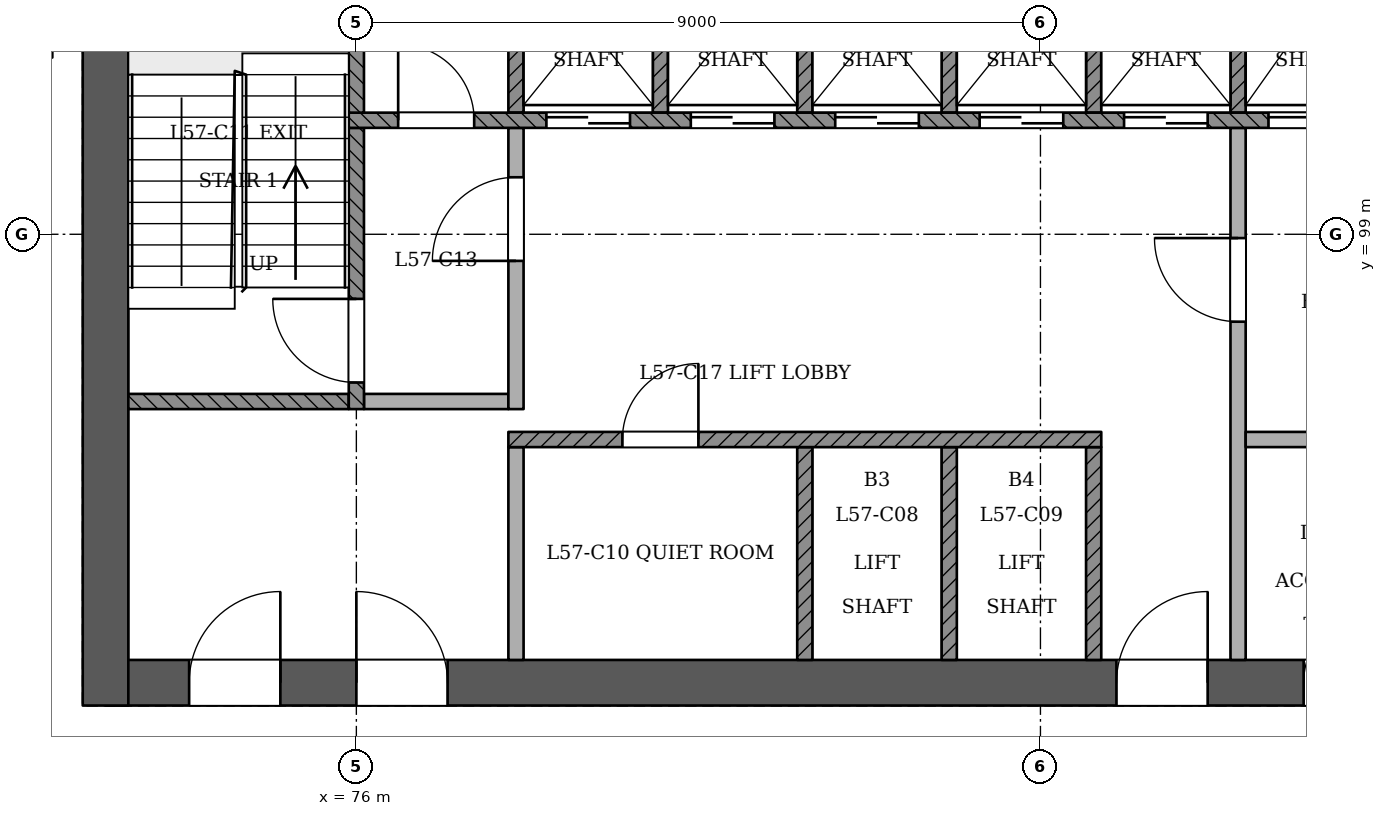
"""IFC4 building model, lengths in metres.
Left out: names, types, materials, properties, quantities, classifications, styles, units other than length and angle.
Written with IfcOpenShell. Run it as: python <this file> out.ifc"""

import sys

from ifc_helpers import new_model, si_unit, direction, frame, frame_2d, origin, place, context, subcontext, project, spatial, rectangle, extrude, element, fill, save


model = new_model("IFC4")
c1 = context("Model", 3, precision=1e-05, world=origin(), true_north=direction((0.0, 1.0)))
c2 = subcontext(c1, "Body", "Model", "MODEL_VIEW")
j1 = project(units=[si_unit("LENGTHUNIT", "METRE"), si_unit("PLANEANGLEUNIT", "RADIAN")], contexts=[c1])
p1 = place(None, origin())
s1 = spatial("IfcSite", under=j1, at=p1, CompositionType="ELEMENT")
p2 = place(p1, origin())
s2 = spatial("IfcBuilding", under=s1, at=p2, CompositionType="ELEMENT")
p3 = place(p2, frame((0.0, 0.0, 223.0)))
s3 = spatial("IfcBuildingStorey", under=s2, at=p3, CompositionType="ELEMENT", Elevation=223.0)
p4 = place(p3, frame((72.7, 93.1, 0.0), z_axis=(0.0, 0.0, 1.0), x_axis=(1.0, 0.0, 0.0)))
e1 = element("IfcWall", 1, at=p4, inside=s3, PredefinedType="SHEAR", context=c2, shape_type="SweptSolid", body=[
    extrude(rectangle(XDim=24.9, YDim=0.6, at=frame_2d((12.45, 0.0))), origin(), (0.0, 0.0, 1.0), 3.6),
])
p5 = place(p4, frame((1.1, 0.0, 0.0)))
e2 = element("IfcOpeningElement", 2, at=p5, cuts=e1, PredefinedType="OPENING", context=c2, shape_type="SweptSolid", body=[
    extrude(rectangle(XDim=1.2, YDim=2.1, at=frame_2d((0.6, 1.05))), frame((0.0, 0.311, 0.0), z_axis=(0.0, -1.0, 0.0), x_axis=(1.0, 0.0, 0.0)), (0.0, 0.0, 1.0), 0.621),
])
p6 = place(p4, frame((3.3, 0.0, 0.0)))
e3 = element("IfcOpeningElement", 3, at=p6, cuts=e1, PredefinedType="OPENING", context=c2, shape_type="SweptSolid", body=[
    extrude(rectangle(XDim=1.2, YDim=2.1, at=frame_2d((0.6, 1.05))), frame((0.0, 0.311, 0.0), z_axis=(0.0, -1.0, 0.0), x_axis=(1.0, 0.0, 0.0)), (0.0, 0.0, 1.0), 0.621),
])
p7 = place(p4, frame((13.3, 0.0, 0.0)))
e4 = element("IfcOpeningElement", 4, at=p7, cuts=e1, PredefinedType="OPENING", context=c2, shape_type="SweptSolid", body=[
    extrude(rectangle(XDim=1.2, YDim=2.1, at=frame_2d((0.6, 1.05))), frame((0.0, 0.311, 0.0), z_axis=(0.0, -1.0, 0.0), x_axis=(1.0, 0.0, 0.0)), (0.0, 0.0, 1.0), 0.621),
])
p8 = place(p4, frame((15.762, 0.0, 0.0)))
e5 = element("IfcOpeningElement", 5, at=p8, cuts=e1, PredefinedType="OPENING", context=c2, shape_type="SweptSolid", body=[
    extrude(rectangle(XDim=1.0, YDim=2.1, at=frame_2d((0.5, 1.05))), frame((0.0, 0.311, 0.0), z_axis=(0.0, -1.0, 0.0), x_axis=(1.0, 0.0, 0.0)), (0.0, 0.0, 1.0), 0.621),
])
p9 = place(p4, frame((18.2, 0.0, 0.0)))
e6 = element("IfcOpeningElement", 6, at=p9, cuts=e1, PredefinedType="OPENING", context=c2, shape_type="SweptSolid", body=[
    extrude(rectangle(XDim=1.0, YDim=2.1, at=frame_2d((0.5, 1.05))), frame((0.0, 0.311, 0.0), z_axis=(0.0, -1.0, 0.0), x_axis=(1.0, 0.0, 0.0)), (0.0, 0.0, 1.0), 0.621),
])
p10 = place(p4, frame((20.55, 0.0, 0.0)))
e7 = element("IfcOpeningElement", 7, at=p10, cuts=e1, PredefinedType="OPENING", context=c2, shape_type="SweptSolid", body=[
    extrude(rectangle(XDim=1.0, YDim=2.1, at=frame_2d((0.5, 1.05))), frame((0.0, 0.311, 0.0), z_axis=(0.0, -1.0, 0.0), x_axis=(1.0, 0.0, 0.0)), (0.0, 0.0, 1.0), 0.621),
])
p11 = place(p4, frame((22.837, 0.0, 0.0)))
e8 = element("IfcOpeningElement", 8, at=p11, cuts=e1, PredefinedType="OPENING", context=c2, shape_type="SweptSolid", body=[
    extrude(rectangle(XDim=1.0, YDim=2.1, at=frame_2d((0.5, 1.05))), frame((0.0, 0.311, 0.0), z_axis=(0.0, -1.0, 0.0), x_axis=(1.0, 0.0, 0.0)), (0.0, 0.0, 1.0), 0.621),
])
p12 = place(p3, frame((72.7, 103.7, 0.0), z_axis=(0.0, 0.0, 1.0), x_axis=(0.0, -1.0, 0.0)))
e9 = element("IfcWall", 9, at=p12, inside=s3, PredefinedType="SHEAR", context=c2, shape_type="SweptSolid", body=[
    extrude(rectangle(XDim=10.9, YDim=0.6, at=frame_2d((5.45, 0.0))), origin(), (0.0, 0.0, 1.0), 3.6),
])
p13 = place(p3, frame((72.0, 101.4, 0.0), z_axis=(0.0, 0.0, 1.0), x_axis=(-1.0, 0.0, 0.0)))
e10 = element("IfcWall", 10, at=p13, inside=s3, PredefinedType="PARTITIONING", context=c2, shape_type="SweptSolid", body=[
    extrude(rectangle(XDim=1.8, YDim=0.15, at=frame_2d((0.9, 0.0))), origin(), (0.0, 0.0, 1.0), 3.2),
])
p14 = place(p3, frame((78.1, 93.4, 0.0), z_axis=(0.0, 0.0, 1.0), x_axis=(0.0, 1.0, 0.0)))
e11 = element("IfcWall", 11, at=p14, inside=s3, PredefinedType="PARTITIONING", context=c2, shape_type="SweptSolid", body=[
    extrude(rectangle(XDim=2.8, YDim=0.2, at=frame_2d((1.4, 0.0))), origin(), (0.0, 0.0, 1.0), 3.2),
])
for number, where, z_axis, x_axis in (
    (12, (81.9, 93.4, 0.0), (0.0, 0.0, 1.0), (0.0, 1.0, 0.0)),
    (13, (83.8, 93.4, 0.0), (0.0, 0.0, 1.0), (0.0, 1.0, 0.0)),
    (14, (85.7, 93.4, 0.0), (0.0, 0.0, 1.0), (0.0, 1.0, 0.0)),
):
    element("IfcWall", number, at=place(p3, frame(where, z_axis=z_axis, x_axis=x_axis)), inside=s3, PredefinedType="SOLIDWALL", context=c2, shape_type="SweptSolid", body=[
        extrude(rectangle(XDim=2.8, YDim=0.2, at=frame_2d((1.4, 0.0))), origin(), (0.0, 0.0, 1.0), 3.2),
    ])
p15 = place(p3, frame((87.6, 93.4, 0.0), z_axis=(0.0, 0.0, 1.0), x_axis=(0.0, 1.0, 0.0)))
e15 = element("IfcWall", 15, at=p15, inside=s3, PredefinedType="PARTITIONING", context=c2, shape_type="SweptSolid", body=[
    extrude(rectangle(XDim=7.0, YDim=0.2, at=frame_2d((3.5, 0.0))), origin(), (0.0, 0.0, 1.0), 3.2),
])
p16 = place(p15, frame((4.45, 0.0, 0.0)))
e16 = element("IfcOpeningElement", 16, at=p16, cuts=e15, PredefinedType="OPENING", context=c2, shape_type="SweptSolid", body=[
    extrude(rectangle(XDim=1.1, YDim=2.1, at=frame_2d((0.55, 1.05))), frame((0.0, 0.11, 0.0), z_axis=(0.0, -1.0, 0.0), x_axis=(1.0, 0.0, 0.0)), (0.0, 0.0, 1.0), 0.221),
])
p17 = place(p3, frame((78.0, 96.3, 0.0), z_axis=(0.0, 0.0, 1.0), x_axis=(1.0, 0.0, 0.0)))
e17 = element("IfcWall", 17, at=p17, inside=s3, PredefinedType="SOLIDWALL", context=c2, shape_type="SweptSolid", body=[
    extrude(rectangle(XDim=7.8, YDim=0.2, at=frame_2d((3.9, 0.0))), origin(), (0.0, 0.0, 1.0), 3.2),
])
p18 = place(p17, frame((1.5, 0.0, 0.0)))
e18 = element("IfcOpeningElement", 18, at=p18, cuts=e17, PredefinedType="OPENING", context=c2, shape_type="SweptSolid", body=[
    extrude(rectangle(XDim=1.0, YDim=2.1, at=frame_2d((0.5, 1.05))), frame((0.0, 0.11, 0.0), z_axis=(0.0, -1.0, 0.0), x_axis=(1.0, 0.0, 0.0)), (0.0, 0.0, 1.0), 0.221),
])
p19 = place(p3, frame((87.7, 96.3, 0.0), z_axis=(0.0, 0.0, 1.0), x_axis=(1.0, 0.0, 0.0)))
e19 = element("IfcWall", 19, at=p19, inside=s3, PredefinedType="PARTITIONING", context=c2, shape_type="SweptSolid", body=[
    extrude(rectangle(XDim=3.6, YDim=0.2, at=frame_2d((1.8, 0.0))), origin(), (0.0, 0.0, 1.0), 3.2),
])
p20 = place(p3, frame((73.0, 96.8, 0.0), z_axis=(0.0, 0.0, 1.0), x_axis=(1.0, 0.0, 0.0)))
e20 = element("IfcWall", 20, at=p20, inside=s3, PredefinedType="SOLIDWALL", context=c2, shape_type="SweptSolid", body=[
    extrude(rectangle(XDim=2.9, YDim=0.2, at=frame_2d((1.45, 0.0))), origin(), (0.0, 0.0, 1.0), 3.2),
])
p21 = place(p3, frame((76.0, 96.7, 0.0), z_axis=(0.0, 0.0, 1.0), x_axis=(0.0, 1.0, 0.0)))
e21 = element("IfcWall", 21, at=p21, inside=s3, PredefinedType="SOLIDWALL", context=c2, shape_type="SweptSolid", body=[
    extrude(rectangle(XDim=3.7, YDim=0.2, at=frame_2d((1.85, 0.0))), origin(), (0.0, 0.0, 1.0), 3.2),
])
p22 = place(p21, frame((0.35, 0.0, 0.0)))
e22 = element("IfcOpeningElement", 22, at=p22, cuts=e21, PredefinedType="OPENING", context=c2, shape_type="SweptSolid", body=[
    extrude(rectangle(XDim=1.1, YDim=2.1, at=frame_2d((0.55, 1.05))), frame((0.0, 0.11, 0.0), z_axis=(0.0, -1.0, 0.0), x_axis=(1.0, 0.0, 0.0)), (0.0, 0.0, 1.0), 0.221),
])
p23 = place(p3, frame((76.1, 96.8, 0.0), z_axis=(0.0, 0.0, 1.0), x_axis=(1.0, 0.0, 0.0)))
e23 = element("IfcWall", 23, at=p23, inside=s3, PredefinedType="PARTITIONING", context=c2, shape_type="SweptSolid", body=[
    extrude(rectangle(XDim=1.9, YDim=0.2, at=frame_2d((0.95, 0.0))), origin(), (0.0, 0.0, 1.0), 3.2),
])
p24 = place(p3, frame((78.1, 96.7, 0.0), z_axis=(0.0, 0.0, 1.0), x_axis=(0.0, 1.0, 0.0)))
e24 = element("IfcWall", 24, at=p24, inside=s3, PredefinedType="PARTITIONING", context=c2, shape_type="SweptSolid", body=[
    extrude(rectangle(XDim=3.7, YDim=0.2, at=frame_2d((1.85, 0.0))), origin(), (0.0, 0.0, 1.0), 3.2),
])
p25 = place(p24, frame((1.95, 0.0, 0.0)))
e25 = element("IfcOpeningElement", 25, at=p25, cuts=e24, PredefinedType="OPENING", context=c2, shape_type="SweptSolid", body=[
    extrude(rectangle(XDim=1.1, YDim=2.1, at=frame_2d((0.55, 1.05))), frame((0.0, 0.11, 0.0), z_axis=(0.0, -1.0, 0.0), x_axis=(1.0, 0.0, 0.0)), (0.0, 0.0, 1.0), 0.221),
])
p26 = place(p3, frame((75.9, 100.5, 0.0), z_axis=(0.0, 0.0, 1.0), x_axis=(1.0, 0.0, 0.0)))
e26 = element("IfcWall", 26, at=p26, inside=s3, PredefinedType="SOLIDWALL", context=c2, shape_type="SweptSolid", body=[
    extrude(rectangle(XDim=18.2, YDim=0.2, at=frame_2d((9.1, 0.0))), origin(), (0.0, 0.0, 1.0), 3.2),
])
p27 = place(p26, frame((2.6, 0.0, 0.0)))
e27 = element("IfcOpeningElement", 27, at=p27, cuts=e26, PredefinedType="OPENING", context=c2, shape_type="SweptSolid", body=[
    extrude(rectangle(XDim=1.1, YDim=2.1, at=frame_2d((0.55, 1.05))), frame((0.0, 0.11, 0.0), z_axis=(0.0, -1.0, 0.0), x_axis=(1.0, 0.0, 0.0)), (0.0, 0.0, 1.0), 0.221),
])
p28 = place(p26, frame((4.5, 0.0, 0.0)))
e28 = element("IfcOpeningElement", 28, at=p28, cuts=e26, PredefinedType="OPENING", context=c2, shape_type="SweptSolid", body=[
    extrude(rectangle(XDim=1.1, YDim=2.1, at=frame_2d((0.55, 1.05))), frame((0.0, 0.11, 0.0), z_axis=(0.0, -1.0, 0.0), x_axis=(1.0, 0.0, 0.0)), (0.0, 0.0, 1.0), 0.221),
])
p29 = place(p26, frame((6.4, 0.0, 0.0)))
e29 = element("IfcOpeningElement", 29, at=p29, cuts=e26, PredefinedType="OPENING", context=c2, shape_type="SweptSolid", body=[
    extrude(rectangle(XDim=1.1, YDim=2.1, at=frame_2d((0.55, 1.05))), frame((0.0, 0.11, 0.0), z_axis=(0.0, -1.0, 0.0), x_axis=(1.0, 0.0, 0.0)), (0.0, 0.0, 1.0), 0.221),
])
p30 = place(p26, frame((8.3, 0.0, 0.0)))
e30 = element("IfcOpeningElement", 30, at=p30, cuts=e26, PredefinedType="OPENING", context=c2, shape_type="SweptSolid", body=[
    extrude(rectangle(XDim=1.1, YDim=2.1, at=frame_2d((0.55, 1.05))), frame((0.0, 0.11, 0.0), z_axis=(0.0, -1.0, 0.0), x_axis=(1.0, 0.0, 0.0)), (0.0, 0.0, 1.0), 0.221),
])
p31 = place(p26, frame((10.2, 0.0, 0.0)))
e31 = element("IfcOpeningElement", 31, at=p31, cuts=e26, PredefinedType="OPENING", context=c2, shape_type="SweptSolid", body=[
    extrude(rectangle(XDim=1.1, YDim=2.1, at=frame_2d((0.55, 1.05))), frame((0.0, 0.11, 0.0), z_axis=(0.0, -1.0, 0.0), x_axis=(1.0, 0.0, 0.0)), (0.0, 0.0, 1.0), 0.221),
])
p32 = place(p26, frame((12.1, 0.0, 0.0)))
e32 = element("IfcOpeningElement", 32, at=p32, cuts=e26, PredefinedType="OPENING", context=c2, shape_type="SweptSolid", body=[
    extrude(rectangle(XDim=1.1, YDim=2.1, at=frame_2d((0.55, 1.05))), frame((0.0, 0.11, 0.0), z_axis=(0.0, -1.0, 0.0), x_axis=(1.0, 0.0, 0.0)), (0.0, 0.0, 1.0), 0.221),
])
p33 = place(p26, frame((14.0, 0.0, 0.0)))
e33 = element("IfcOpeningElement", 33, at=p33, cuts=e26, PredefinedType="OPENING", context=c2, shape_type="SweptSolid", body=[
    extrude(rectangle(XDim=1.1, YDim=2.1, at=frame_2d((0.55, 1.05))), frame((0.0, 0.11, 0.0), z_axis=(0.0, -1.0, 0.0), x_axis=(1.0, 0.0, 0.0)), (0.0, 0.0, 1.0), 0.221),
])
p34 = place(p26, frame((0.65, 0.0, 0.0)))
e34 = element("IfcOpeningElement", 34, at=p34, cuts=e26, PredefinedType="OPENING", context=c2, shape_type="SweptSolid", body=[
    extrude(rectangle(XDim=1.0, YDim=2.1, at=frame_2d((0.5, 1.05))), frame((0.0, 0.11, 0.0), z_axis=(0.0, -1.0, 0.0), x_axis=(1.0, 0.0, 0.0)), (0.0, 0.0, 1.0), 0.221),
])
p35 = place(p26, frame((16.3, 0.0, 0.0)))
e35 = element("IfcOpeningElement", 35, at=p35, cuts=e26, PredefinedType="OPENING", context=c2, shape_type="SweptSolid", body=[
    extrude(rectangle(XDim=1.0, YDim=2.1, at=frame_2d((0.5, 1.05))), frame((0.0, 0.11, 0.0), z_axis=(0.0, -1.0, 0.0), x_axis=(1.0, 0.0, 0.0)), (0.0, 0.0, 1.0), 0.221),
])
for number, where, z_axis, x_axis in (
    (36, (76.0, 100.6, 0.0), (0.0, 0.0, 1.0), (0.0, 1.0, 0.0)),
    (37, (78.1, 100.6, 0.0), (0.0, 0.0, 1.0), (0.0, 1.0, 0.0)),
    (38, (80.0, 100.6, 0.0), (0.0, 0.0, 1.0), (0.0, 1.0, 0.0)),
    (39, (81.9, 100.6, 0.0), (0.0, 0.0, 1.0), (0.0, 1.0, 0.0)),
    (40, (83.8, 100.6, 0.0), (0.0, 0.0, 1.0), (0.0, 1.0, 0.0)),
    (41, (85.7, 100.6, 0.0), (0.0, 0.0, 1.0), (0.0, 1.0, 0.0)),
    (42, (87.6, 100.6, 0.0), (0.0, 0.0, 1.0), (0.0, 1.0, 0.0)),
):
    element("IfcWall", number, at=place(p3, frame(where, z_axis=z_axis, x_axis=x_axis)), inside=s3, PredefinedType="SOLIDWALL", context=c2, shape_type="SweptSolid", body=[
        extrude(rectangle(XDim=2.8, YDim=0.2, at=frame_2d((1.4, 0.0))), origin(), (0.0, 0.0, 1.0), 3.2),
    ])
p36 = place(p27, origin())
e43 = element("IfcDoor", 43, at=p36, inside=s3, OperationType="SLIDING_TO_RIGHT", PredefinedType="NOTDEFINED", context=c2, shape_type="SweptSolid", body=[
    extrude(rectangle(XDim=1.1, YDim=2.1, at=frame_2d((0.55, 1.05))), frame((0.0, 0.025, 0.0), z_axis=(0.0, -1.0, 0.0), x_axis=(1.0, 0.0, 0.0)), (0.0, 0.0, 1.0), 0.05),
])
fill(e27, e43)
p37 = place(p28, origin())
e44 = element("IfcDoor", 44, at=p37, inside=s3, OperationType="SLIDING_TO_LEFT", PredefinedType="NOTDEFINED", context=c2, shape_type="SweptSolid", body=[
    extrude(rectangle(XDim=1.1, YDim=2.1, at=frame_2d((0.55, 1.05))), frame((0.0, 0.025, 0.0), z_axis=(0.0, -1.0, 0.0), x_axis=(1.0, 0.0, 0.0)), (0.0, 0.0, 1.0), 0.05),
])
fill(e28, e44)
p38 = place(p29, origin())
e45 = element("IfcDoor", 45, at=p38, inside=s3, OperationType="SLIDING_TO_RIGHT", PredefinedType="NOTDEFINED", context=c2, shape_type="SweptSolid", body=[
    extrude(rectangle(XDim=1.1, YDim=2.1, at=frame_2d((0.55, 1.05))), frame((0.0, 0.025, 0.0), z_axis=(0.0, -1.0, 0.0), x_axis=(1.0, 0.0, 0.0)), (0.0, 0.0, 1.0), 0.05),
])
fill(e29, e45)
p39 = place(p30, origin())
e46 = element("IfcDoor", 46, at=p39, inside=s3, OperationType="SLIDING_TO_LEFT", PredefinedType="NOTDEFINED", context=c2, shape_type="SweptSolid", body=[
    extrude(rectangle(XDim=1.1, YDim=2.1, at=frame_2d((0.55, 1.05))), frame((0.0, 0.025, 0.0), z_axis=(0.0, -1.0, 0.0), x_axis=(1.0, 0.0, 0.0)), (0.0, 0.0, 1.0), 0.05),
])
fill(e30, e46)
p40 = place(p31, origin())
e47 = element("IfcDoor", 47, at=p40, inside=s3, OperationType="SLIDING_TO_RIGHT", PredefinedType="NOTDEFINED", context=c2, shape_type="SweptSolid", body=[
    extrude(rectangle(XDim=1.1, YDim=2.1, at=frame_2d((0.55, 1.05))), frame((0.0, 0.025, 0.0), z_axis=(0.0, -1.0, 0.0), x_axis=(1.0, 0.0, 0.0)), (0.0, 0.0, 1.0), 0.05),
])
fill(e31, e47)
p41 = place(p32, origin())
e48 = element("IfcDoor", 48, at=p41, inside=s3, OperationType="SLIDING_TO_RIGHT", PredefinedType="NOTDEFINED", context=c2, shape_type="SweptSolid", body=[
    extrude(rectangle(XDim=1.1, YDim=2.1, at=frame_2d((0.55, 1.05))), frame((0.0, 0.025, 0.0), z_axis=(0.0, -1.0, 0.0), x_axis=(1.0, 0.0, 0.0)), (0.0, 0.0, 1.0), 0.05),
])
fill(e32, e48)
p42 = place(p22, origin())
e49 = element("IfcDoor", 49, at=p42, inside=s3, OperationType="SINGLE_SWING_RIGHT", PredefinedType="NOTDEFINED", context=c2, shape_type="SweptSolid", body=[
    extrude(rectangle(XDim=1.1, YDim=2.1, at=frame_2d((0.55, 1.05))), frame((0.0, 0.025, 0.0), z_axis=(0.0, -1.0, 0.0), x_axis=(1.0, 0.0, 0.0)), (0.0, 0.0, 1.0), 0.05),
])
fill(e22, e49)
p43 = place(p25, origin())
e50 = element("IfcDoor", 50, at=p43, inside=s3, OperationType="SINGLE_SWING_LEFT", PredefinedType="NOTDEFINED", context=c2, shape_type="SweptSolid", body=[
    extrude(rectangle(XDim=1.1, YDim=2.1, at=frame_2d((0.55, 1.05))), frame((0.0, 0.025, 0.0), z_axis=(0.0, -1.0, 0.0), x_axis=(1.0, 0.0, 0.0)), (0.0, 0.0, 1.0), 0.05),
])
fill(e25, e50)
p44 = place(p16, origin())
e51 = element("IfcDoor", 51, at=p44, inside=s3, OperationType="SINGLE_SWING_RIGHT", PredefinedType="NOTDEFINED", context=c2, shape_type="SweptSolid", body=[
    extrude(rectangle(XDim=1.1, YDim=2.1, at=frame_2d((0.55, 1.05))), frame((0.0, 0.025, 0.0), z_axis=(0.0, -1.0, 0.0), x_axis=(1.0, 0.0, 0.0)), (0.0, 0.0, 1.0), 0.05),
])
fill(e16, e51)
p45 = place(p5, origin())
e52 = element("IfcDoor", 52, at=p45, inside=s3, OperationType="SINGLE_SWING_RIGHT", PredefinedType="NOTDEFINED", context=c2, shape_type="SweptSolid", body=[
    extrude(rectangle(XDim=1.2, YDim=2.1, at=frame_2d((0.6, 1.05))), frame((0.0, 0.025, 0.0), z_axis=(0.0, -1.0, 0.0), x_axis=(1.0, 0.0, 0.0)), (0.0, 0.0, 1.0), 0.05),
])
fill(e2, e52)
p46 = place(p6, origin())
e53 = element("IfcDoor", 53, at=p46, inside=s3, OperationType="SINGLE_SWING_LEFT", PredefinedType="NOTDEFINED", context=c2, shape_type="SweptSolid", body=[
    extrude(rectangle(XDim=1.2, YDim=2.1, at=frame_2d((0.6, 1.05))), frame((0.0, 0.025, 0.0), z_axis=(0.0, -1.0, 0.0), x_axis=(1.0, 0.0, 0.0)), (0.0, 0.0, 1.0), 0.05),
])
fill(e3, e53)
p47 = place(p7, origin())
e54 = element("IfcDoor", 54, at=p47, inside=s3, OperationType="SINGLE_SWING_RIGHT", PredefinedType="NOTDEFINED", context=c2, shape_type="SweptSolid", body=[
    extrude(rectangle(XDim=1.2, YDim=2.1, at=frame_2d((0.6, 1.05))), frame((0.0, 0.025, 0.0), z_axis=(0.0, -1.0, 0.0), x_axis=(1.0, 0.0, 0.0)), (0.0, 0.0, 1.0), 0.05),
])
fill(e4, e54)
p48 = place(p34, origin())
e55 = element("IfcDoor", 55, at=p48, inside=s3, OperationType="SINGLE_SWING_LEFT", PredefinedType="NOTDEFINED", context=c2, shape_type="SweptSolid", body=[
    extrude(rectangle(XDim=1.0, YDim=2.1, at=frame_2d((0.5, 1.05))), frame((0.0, 0.025, 0.0), z_axis=(0.0, -1.0, 0.0), x_axis=(1.0, 0.0, 0.0)), (0.0, 0.0, 1.0), 0.05),
])
fill(e34, e55)
p49 = place(p8, origin())
e56 = element("IfcDoor", 56, at=p49, inside=s3, OperationType="SINGLE_SWING_RIGHT", PredefinedType="NOTDEFINED", context=c2, shape_type="SweptSolid", body=[
    extrude(rectangle(XDim=1.0, YDim=2.1, at=frame_2d((0.5, 1.05))), frame((0.0, 0.025, 0.0), z_axis=(0.0, -1.0, 0.0), x_axis=(1.0, 0.0, 0.0)), (0.0, 0.0, 1.0), 0.05),
])
fill(e5, e56)
p50 = place(p18, origin())
e57 = element("IfcDoor", 57, at=p50, inside=s3, OperationType="SINGLE_SWING_RIGHT", PredefinedType="NOTDEFINED", context=c2, shape_type="SweptSolid", body=[
    extrude(rectangle(XDim=1.0, YDim=2.1, at=frame_2d((0.5, 1.05))), frame((0.0, 0.025, 0.0), z_axis=(0.0, -1.0, 0.0), x_axis=(1.0, 0.0, 0.0)), (0.0, 0.0, 1.0), 0.05),
])
fill(e18, e57)
save(model, sys.argv[1])
